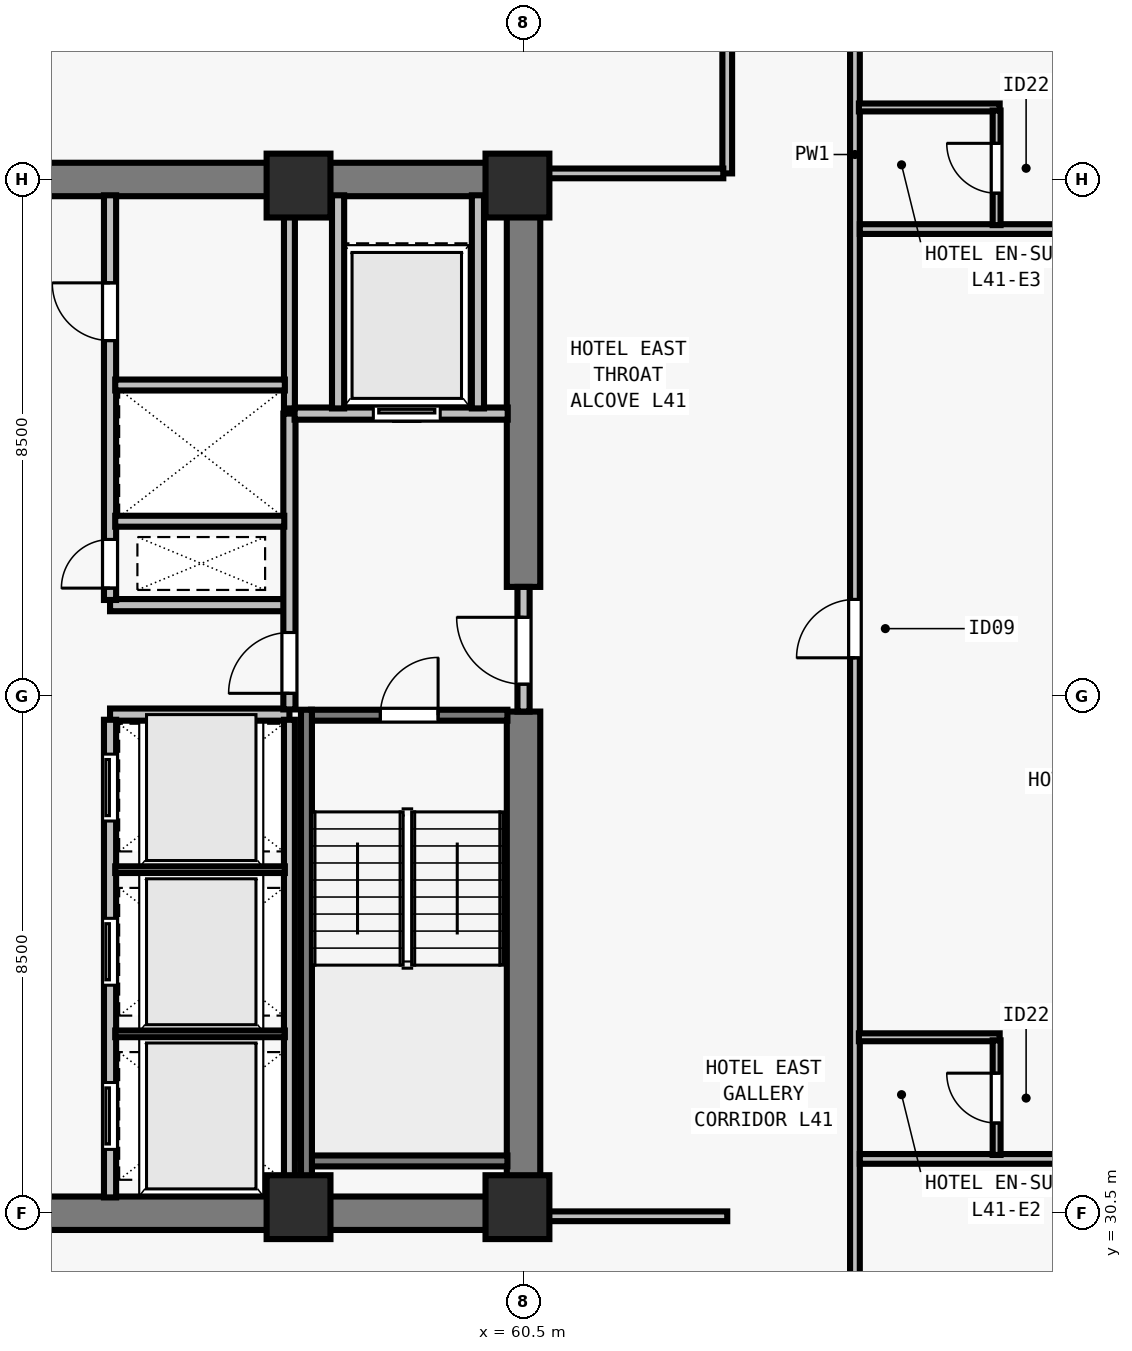
"""IFC4 building model, lengths in metres.
Left out: names, types, materials, properties, quantities, classifications, styles, units other than length and angle.
Written with IfcOpenShell. Run it as: python <this file> out.ifc"""

import sys

from ifc_helpers import new_model, si_unit, direction, frame, frame_2d, origin, origin_2d, place, context, subcontext, project, spatial, rectangle, extrude, element, fill, save


model = new_model("IFC4")
c1 = context("Model", 3, precision=1e-05, world=origin(), true_north=direction((0.0, 1.0)))
c2 = subcontext(c1, "Body", "Model", "MODEL_VIEW")
j1 = project(units=[si_unit("LENGTHUNIT", "METRE"), si_unit("PLANEANGLEUNIT", "RADIAN")], contexts=[c1])
p1 = place(None, origin())
s1 = spatial("IfcSite", under=j1, at=p1, CompositionType="ELEMENT")
p2 = place(p1, origin())
s2 = spatial("IfcBuilding", under=s1, at=p2, CompositionType="ELEMENT")
p3 = place(p2, frame((0.0, 0.0, 151.5)))
s3 = spatial("IfcBuildingStorey", under=s2, at=p3, CompositionType="ELEMENT", Elevation=151.5)
for number, where, z_axis, x_axis in (
    (1, (56.8, 30.6, 0.0), (0.0, 0.0, 1.0), (1.0, 0.0, 0.0)),
    (2, (60.4, 30.6, 0.0), (0.0, 0.0, 1.0), (1.0, 0.0, 0.0)),
    (3, (56.8, 47.4, 0.0), (0.0, 0.0, 1.0), (1.0, 0.0, 0.0)),
    (4, (60.4, 47.4, 0.0), (0.0, 0.0, 1.0), (1.0, 0.0, 0.0)),
):
    element("IfcColumn", number, at=place(p3, frame(where, z_axis=z_axis, x_axis=x_axis)), inside=s3, PredefinedType="COLUMN", context=c2, shape_type="SweptSolid", body=[
        extrude(rectangle(XDim=1.05, YDim=1.05, at=origin_2d()), origin(), (0.0, 0.0, 1.0), 3.5),
    ])
for number, where, z_axis, x_axis in (
    (5, (43.225, 30.5, 0.0), (0.0, 0.0, 1.0), (1.0, 0.0, 0.0)),
    (6, (43.225, 47.5, 0.0), (0.0, 0.0, 1.0), (1.0, 0.0, 0.0)),
):
    element("IfcWall", number, at=place(p3, frame(where, z_axis=z_axis, x_axis=x_axis)), inside=s3, PredefinedType="SHEAR", context=c2, shape_type="SweptSolid", body=[
        extrude(rectangle(XDim=17.55, YDim=0.55, at=frame_2d((8.775, 0.0))), origin(), (0.0, 0.0, 1.0), 3.28),
    ])
p4 = place(p3, frame((60.5, 30.765, 0.0), z_axis=(0.0, 0.0, 1.0), x_axis=(0.0, 1.0, 0.0)))
e7 = element("IfcWall", 7, at=p4, inside=s3, PredefinedType="SHEAR", context=c2, shape_type="SweptSolid", body=[
    extrude(rectangle(XDim=7.985, YDim=0.55, at=frame_2d((3.993, 0.0))), origin(), (0.0, 0.0, 1.0), 3.28),
])
p5 = place(p3, frame((60.5, 40.8, 0.0), z_axis=(0.0, 0.0, 1.0), x_axis=(0.0, 1.0, 0.0)))
e8 = element("IfcWall", 8, at=p5, inside=s3, PredefinedType="SHEAR", context=c2, shape_type="SweptSolid", body=[
    extrude(rectangle(XDim=6.435, YDim=0.55, at=frame_2d((3.218, 0.0))), origin(), (0.0, 0.0, 1.0), 3.28),
])
for number, where, z_axis, x_axis in (
    (9, (53.7, 38.7, 0.0), (0.0, 0.0, 1.0), (1.0, 0.0, 0.0)),
    (10, (53.7, 40.5, 0.0), (0.0, 0.0, 1.0), (1.0, 0.0, 0.0)),
):
    element("IfcWall", number, at=place(p3, frame(where, z_axis=z_axis, x_axis=x_axis)), inside=s3, PredefinedType="SOLIDWALL", context=c2, shape_type="SweptSolid", body=[
        extrude(rectangle(XDim=2.95, YDim=0.2, at=frame_2d((1.475, 0.0))), origin(), (0.0, 0.0, 1.0), 3.28),
    ])
p6 = place(p3, frame((53.7, 30.76, 0.0), z_axis=(0.0, 0.0, 1.0), x_axis=(0.0, 1.0, 0.0)))
e11 = element("IfcWall", 11, at=p6, inside=s3, PredefinedType="SOLIDWALL", context=c2, shape_type="SweptSolid", body=[
    extrude(rectangle(XDim=7.855, YDim=0.2, at=frame_2d((3.927, 0.0))), origin(), (0.0, 0.0, 1.0), 3.28),
])
p7 = place(p6, frame((0.79, 0.0, 0.0)))
e12 = element("IfcOpeningElement", 12, at=p7, cuts=e11, PredefinedType="OPENING", context=c2, shape_type="SweptSolid", body=[
    extrude(rectangle(XDim=1.1, YDim=2.2, at=frame_2d((0.55, 1.1))), frame((0.0, 0.11, 0.0), z_axis=(0.0, -1.0, 0.0), x_axis=(1.0, 0.0, 0.0)), (0.0, 0.0, 1.0), 0.22),
])
p8 = place(p6, frame((3.49, 0.0, 0.0)))
e13 = element("IfcOpeningElement", 13, at=p8, cuts=e11, PredefinedType="OPENING", context=c2, shape_type="SweptSolid", body=[
    extrude(rectangle(XDim=1.1, YDim=2.2, at=frame_2d((0.55, 1.1))), frame((0.0, 0.11, 0.0), z_axis=(0.0, -1.0, 0.0), x_axis=(1.0, 0.0, 0.0)), (0.0, 0.0, 1.0), 0.22),
])
p9 = place(p6, frame((6.19, 0.0, 0.0)))
e14 = element("IfcOpeningElement", 14, at=p9, cuts=e11, PredefinedType="OPENING", context=c2, shape_type="SweptSolid", body=[
    extrude(rectangle(XDim=1.1, YDim=2.2, at=frame_2d((0.55, 1.1))), frame((0.0, 0.11, 0.0), z_axis=(0.0, -1.0, 0.0), x_axis=(1.0, 0.0, 0.0)), (0.0, 0.0, 1.0), 0.22),
])
p10 = place(p3, frame((53.7, 40.585, 0.0), z_axis=(0.0, 0.0, 1.0), x_axis=(0.0, 1.0, 0.0)))
e15 = element("IfcWall", 15, at=p10, inside=s3, PredefinedType="SOLIDWALL", context=c2, shape_type="SweptSolid", body=[
    extrude(rectangle(XDim=6.655, YDim=0.2, at=frame_2d((3.328, 0.0))), origin(), (0.0, 0.0, 1.0), 3.28),
])
p11 = place(p10, frame((0.195, 0.0, 0.0)))
e16 = element("IfcOpeningElement", 16, at=p11, cuts=e15, PredefinedType="OPENING", context=c2, shape_type="SweptSolid", body=[
    extrude(rectangle(XDim=0.8, YDim=2.08, at=frame_2d((0.4, 1.04))), frame((0.0, 0.11, 0.0), z_axis=(0.0, -1.0, 0.0), x_axis=(1.0, 0.0, 0.0)), (0.0, 0.0, 1.0), 0.22),
])
p12 = place(p10, frame((4.265, 0.0, 0.0)))
e17 = element("IfcOpeningElement", 17, at=p12, cuts=e15, PredefinedType="OPENING", context=c2, shape_type="SweptSolid", body=[
    extrude(rectangle(XDim=0.95, YDim=2.12, at=frame_2d((0.475, 1.06))), frame((0.0, 0.11, 0.0), z_axis=(0.0, -1.0, 0.0), x_axis=(1.0, 0.0, 0.0)), (0.0, 0.0, 1.0), 0.22),
])
p13 = place(p3, frame((60.5, 38.75, 0.0), z_axis=(0.0, 0.0, 1.0), x_axis=(0.0, 1.0, 0.0)))
e18 = element("IfcWall", 18, at=p13, inside=s3, PredefinedType="SOLIDWALL", context=c2, shape_type="SweptSolid", body=[
    extrude(rectangle(XDim=2.05, YDim=0.2, at=frame_2d((1.025, 0.0))), origin(), (0.0, 0.0, 1.0), 3.28),
])
p14 = place(p13, frame((0.45, 0.0, 0.0)))
e19 = element("IfcOpeningElement", 19, at=p14, cuts=e18, PredefinedType="OPENING", context=c2, shape_type="SweptSolid", body=[
    extrude(rectangle(XDim=1.1, YDim=2.15, at=frame_2d((0.55, 1.075))), frame((0.0, 0.11, 0.0), z_axis=(0.0, -1.0, 0.0), x_axis=(1.0, 0.0, 0.0)), (0.0, 0.0, 1.0), 0.22),
])
p15 = place(p3, frame((56.65, 38.785, 0.0), z_axis=(0.0, 0.0, 1.0), x_axis=(0.0, 1.0, 0.0)))
e20 = element("IfcWall", 20, at=p15, inside=s3, PredefinedType="SOLIDWALL", context=c2, shape_type="SweptSolid", body=[
    extrude(rectangle(XDim=4.865, YDim=0.2, at=frame_2d((2.433, 0.0))), origin(), (0.0, 0.0, 1.0), 3.28),
])
p16 = place(p15, frame((0.265, 0.0, 0.0)))
e21 = element("IfcOpeningElement", 21, at=p16, cuts=e20, PredefinedType="OPENING", context=c2, shape_type="SweptSolid", body=[
    extrude(rectangle(XDim=1.0, YDim=2.15, at=frame_2d((0.5, 1.075))), frame((0.0, 0.11, 0.0), z_axis=(0.0, -1.0, 0.0), x_axis=(1.0, 0.0, 0.0)), (0.0, 0.0, 1.0), 0.22),
])
p17 = place(p3, frame((56.735, 43.65, 0.0), z_axis=(0.0, 0.0, 1.0), x_axis=(1.0, 0.0, 0.0)))
e22 = element("IfcWall", 22, at=p17, inside=s3, PredefinedType="SOLIDWALL", context=c2, shape_type="SweptSolid", body=[
    extrude(rectangle(XDim=3.505, YDim=0.2, at=frame_2d((1.752, 0.0))), origin(), (0.0, 0.0, 1.0), 3.28),
])
p18 = place(p17, frame((1.295, 0.0, 0.0)))
e23 = element("IfcOpeningElement", 23, at=p18, cuts=e22, PredefinedType="OPENING", context=c2, shape_type="SweptSolid", body=[
    extrude(rectangle(XDim=1.1, YDim=2.2, at=frame_2d((0.55, 1.1))), frame((0.0, 0.11, 0.0), z_axis=(0.0, -1.0, 0.0), x_axis=(1.0, 0.0, 0.0)), (0.0, 0.0, 1.0), 0.22),
])
for number, where, z_axis, x_axis in (
    (24, (57.45, 43.735, 0.0), (0.0, 0.0, 1.0), (0.0, 1.0, 0.0)),
    (25, (59.75, 43.735, 0.0), (0.0, 0.0, 1.0), (0.0, 1.0, 0.0)),
):
    element("IfcWall", number, at=place(p3, frame(where, z_axis=z_axis, x_axis=x_axis)), inside=s3, PredefinedType="SOLIDWALL", context=c2, shape_type="SweptSolid", body=[
        extrude(rectangle(XDim=3.505, YDim=0.2, at=frame_2d((1.752, 0.0))), origin(), (0.0, 0.0, 1.0), 3.28),
    ])
p19 = place(p3, frame((56.65, 30.76, 0.0), z_axis=(0.0, 0.0, 1.0), x_axis=(0.0, 1.0, 0.0)))
e26 = element("IfcWall", 26, at=p19, inside=s3, PredefinedType="SOLIDWALL", context=c2, shape_type="SweptSolid", body=[
    extrude(rectangle(XDim=7.855, YDim=0.18, at=frame_2d((3.927, 0.0))), origin(), (0.0, 0.0, 1.0), 3.28),
])
for number, where, z_axis, x_axis in (
    (27, (53.785, 33.45, 0.0), (0.0, 0.0, 1.0), (1.0, 0.0, 0.0)),
    (28, (53.785, 36.15, 0.0), (0.0, 0.0, 1.0), (1.0, 0.0, 0.0)),
):
    element("IfcWall", number, at=place(p3, frame(where, z_axis=z_axis, x_axis=x_axis)), inside=s3, PredefinedType="PARTITIONING", context=c2, shape_type="SweptSolid", body=[
        extrude(rectangle(XDim=2.79, YDim=0.11, at=frame_2d((1.395, 0.0))), origin(), (0.0, 0.0, 1.0), 3.28),
    ])
p20 = place(p3, frame((56.65, 43.735, 0.0), z_axis=(0.0, 0.0, 1.0), x_axis=(0.0, 1.0, 0.0)))
e29 = element("IfcWall", 29, at=p20, inside=s3, PredefinedType="SOLIDWALL", context=c2, shape_type="SweptSolid", body=[
    extrude(rectangle(XDim=3.505, YDim=0.18, at=frame_2d((1.752, 0.0))), origin(), (0.0, 0.0, 1.0), 3.28),
])
p21 = place(p3, frame((53.785, 41.88, 0.0), z_axis=(0.0, 0.0, 1.0), x_axis=(1.0, 0.0, 0.0)))
e30 = element("IfcWall", 30, at=p21, inside=s3, PredefinedType="SOLIDWALL", context=c2, shape_type="SweptSolid", body=[
    extrude(rectangle(XDim=2.78, YDim=0.18, at=frame_2d((1.39, 0.0))), origin(), (0.0, 0.0, 1.0), 3.28),
])
p22 = place(p3, frame((53.785, 44.12, 0.0), z_axis=(0.0, 0.0, 1.0), x_axis=(1.0, 0.0, 0.0)))
e31 = element("IfcWall", 31, at=p22, inside=s3, PredefinedType="SOLIDWALL", context=c2, shape_type="SweptSolid", body=[
    extrude(rectangle(XDim=2.79, YDim=0.18, at=frame_2d((1.395, 0.0))), origin(), (0.0, 0.0, 1.0), 3.28),
])
p23 = place(p3, frame((65.95, 15.325, 0.0), z_axis=(0.0, 0.0, 1.0), x_axis=(0.0, 1.0, 0.0)))
e32 = element("IfcWall", 32, at=p23, inside=s3, PredefinedType="PARTITIONING", context=c2, shape_type="SweptSolid", body=[
    extrude(rectangle(XDim=47.35, YDim=0.16, at=frame_2d((23.675, 0.0))), origin(), (0.0, 0.0, 1.0), 2.555),
])
p24 = place(p23, frame((8.902, 0.0, 0.0)))
e33 = element("IfcOpeningElement", 33, at=p24, cuts=e32, PredefinedType="OPENING", context=c2, shape_type="SweptSolid", body=[
    extrude(rectangle(XDim=0.96, YDim=2.15, at=frame_2d((0.48, 1.075))), frame((0.0, 0.09, 0.0), z_axis=(0.0, -1.0, 0.0), x_axis=(1.0, 0.0, 0.0)), (0.0, 0.0, 1.0), 0.18),
])
p25 = place(p23, frame((24.309, 0.0, 0.0)))
e34 = element("IfcOpeningElement", 34, at=p25, cuts=e32, PredefinedType="OPENING", context=c2, shape_type="SweptSolid", body=[
    extrude(rectangle(XDim=0.96, YDim=2.15, at=frame_2d((0.48, 1.075))), frame((0.0, 0.09, 0.0), z_axis=(0.0, -1.0, 0.0), x_axis=(1.0, 0.0, 0.0)), (0.0, 0.0, 1.0), 0.18),
])
p26 = place(p23, frame((39.902, 0.0, 0.0)))
e35 = element("IfcOpeningElement", 35, at=p26, cuts=e32, PredefinedType="OPENING", context=c2, shape_type="SweptSolid", body=[
    extrude(rectangle(XDim=0.96, YDim=2.15, at=frame_2d((0.48, 1.075))), frame((0.0, 0.09, 0.0), z_axis=(0.0, -1.0, 0.0), x_axis=(1.0, 0.0, 0.0)), (0.0, 0.0, 1.0), 0.18),
])
p27 = place(p3, frame((63.85, 47.6, 0.0), z_axis=(0.0, 0.0, 1.0), x_axis=(0.0, 1.0, 0.0)))
e36 = element("IfcWall", 36, at=p27, inside=s3, PredefinedType="PARTITIONING", context=c2, shape_type="SweptSolid", body=[
    extrude(rectangle(XDim=15.075, YDim=0.16, at=frame_2d((7.538, 0.0))), origin(), (0.0, 0.0, 1.0), 2.555),
])
p28 = place(p3, frame((60.765, 30.45, 0.0), z_axis=(0.0, 0.0, 1.0), x_axis=(1.0, 0.0, 0.0)))
e37 = element("IfcWall", 37, at=p28, inside=s3, PredefinedType="PARTITIONING", context=c2, shape_type="SweptSolid", body=[
    extrude(rectangle(XDim=3.085, YDim=0.16, at=frame_2d((1.542, 0.0))), origin(), (0.0, 0.0, 1.0), 3.28),
])
p29 = place(p3, frame((60.765, 47.6, 0.0), z_axis=(0.0, 0.0, 1.0), x_axis=(1.0, 0.0, 0.0)))
e38 = element("IfcWall", 38, at=p29, inside=s3, PredefinedType="PARTITIONING", context=c2, shape_type="SweptSolid", body=[
    extrude(rectangle(XDim=3.02, YDim=0.16, at=frame_2d((1.51, 0.0))), origin(), (0.0, 0.0, 1.0), 3.28),
])
p30 = place(p3, frame((66.03, 31.394, 0.0), z_axis=(0.0, 0.0, 1.0), x_axis=(1.0, 0.0, 0.0)))
e39 = element("IfcWall", 39, at=p30, inside=s3, PredefinedType="PARTITIONING", context=c2, shape_type="SweptSolid", body=[
    extrude(rectangle(XDim=9.645, YDim=0.16, at=frame_2d((4.823, 0.0))), origin(), (0.0, 0.0, 1.0), 3.28),
])
p31 = place(p3, frame((66.015, 33.394, 0.0), z_axis=(0.0, 0.0, 1.0), x_axis=(1.0, 0.0, 0.0)))
e40 = element("IfcWall", 40, at=p31, inside=s3, PredefinedType="PLUMBINGWALL", context=c2, shape_type="SweptSolid", body=[
    extrude(rectangle(XDim=2.315, YDim=0.13, at=frame_2d((1.158, 0.0))), origin(), (0.0, 0.0, 1.0), 3.28),
])
p32 = place(p3, frame((68.28, 31.458, 0.0), z_axis=(0.0, 0.0, 1.0), x_axis=(0.0, 1.0, 0.0)))
e41 = element("IfcWall", 41, at=p32, inside=s3, PredefinedType="PLUMBINGWALL", context=c2, shape_type="SweptSolid", body=[
    extrude(rectangle(XDim=1.885, YDim=0.13, at=frame_2d((0.942, 0.0))), origin(), (0.0, 0.0, 1.0), 3.28),
])
p33 = place(p32, frame((0.525, 0.0, 0.0)))
e42 = element("IfcOpeningElement", 42, at=p33, cuts=e41, PredefinedType="OPENING", context=c2, shape_type="SweptSolid", body=[
    extrude(rectangle(XDim=0.82, YDim=2.1, at=frame_2d((0.41, 1.05))), frame((0.0, 0.075, 0.0), z_axis=(0.0, -1.0, 0.0), x_axis=(1.0, 0.0, 0.0)), (0.0, 0.0, 1.0), 0.15),
])
p34 = place(p3, frame((66.03, 46.685, 0.0), z_axis=(0.0, 0.0, 1.0), x_axis=(1.0, 0.0, 0.0)))
e43 = element("IfcWall", 43, at=p34, inside=s3, PredefinedType="PARTITIONING", context=c2, shape_type="SweptSolid", body=[
    extrude(rectangle(XDim=9.645, YDim=0.16, at=frame_2d((4.823, 0.0))), origin(), (0.0, 0.0, 1.0), 3.28),
])
p35 = place(p3, frame((66.015, 48.685, 0.0), z_axis=(0.0, 0.0, 1.0), x_axis=(1.0, 0.0, 0.0)))
e44 = element("IfcWall", 44, at=p35, inside=s3, PredefinedType="PLUMBINGWALL", context=c2, shape_type="SweptSolid", body=[
    extrude(rectangle(XDim=2.315, YDim=0.13, at=frame_2d((1.158, 0.0))), origin(), (0.0, 0.0, 1.0), 3.28),
])
p36 = place(p3, frame((68.28, 46.75, 0.0), z_axis=(0.0, 0.0, 1.0), x_axis=(0.0, 1.0, 0.0)))
e45 = element("IfcWall", 45, at=p36, inside=s3, PredefinedType="PLUMBINGWALL", context=c2, shape_type="SweptSolid", body=[
    extrude(rectangle(XDim=1.885, YDim=0.13, at=frame_2d((0.942, 0.0))), origin(), (0.0, 0.0, 1.0), 3.28),
])
p37 = place(p36, frame((0.525, 0.0, 0.0)))
e46 = element("IfcOpeningElement", 46, at=p37, cuts=e45, PredefinedType="OPENING", context=c2, shape_type="SweptSolid", body=[
    extrude(rectangle(XDim=0.82, YDim=2.1, at=frame_2d((0.41, 1.05))), frame((0.0, 0.075, 0.0), z_axis=(0.0, -1.0, 0.0), x_axis=(1.0, 0.0, 0.0)), (0.0, 0.0, 1.0), 0.15),
])
p38 = place(p3, frame((57.005, 38.69, 0.0), z_axis=(0.0, 0.0, 1.0), x_axis=(1.0, 0.0, 0.0)))
e47 = element("IfcWall", 47, at=p38, inside=s3, PredefinedType="SOLIDWALL", context=c2, shape_type="SweptSolid", body=[
    extrude(rectangle(XDim=3.23, YDim=0.18, at=frame_2d((1.615, 0.0))), origin(), (0.0, 0.0, 1.0), 3.28),
])
p39 = place(p38, frame((1.14, 0.0, 0.0)))
e48 = element("IfcOpeningElement", 48, at=p39, cuts=e47, PredefinedType="OPENING", context=c2, shape_type="SweptSolid", body=[
    extrude(rectangle(XDim=0.95, YDim=2.15, at=frame_2d((0.475, 1.075))), frame((0.0, 0.1, 0.0), z_axis=(0.0, -1.0, 0.0), x_axis=(1.0, 0.0, 0.0)), (0.0, 0.0, 1.0), 0.2),
])
p40 = place(p3, frame((57.005, 31.36, 0.0), z_axis=(0.0, 0.0, 1.0), x_axis=(1.0, 0.0, 0.0)))
e49 = element("IfcWall", 49, at=p40, inside=s3, PredefinedType="SOLIDWALL", context=c2, shape_type="SweptSolid", body=[
    extrude(rectangle(XDim=3.23, YDim=0.18, at=frame_2d((1.615, 0.0))), origin(), (0.0, 0.0, 1.0), 3.28),
])
p41 = place(p3, frame((56.93, 38.78, 0.0), z_axis=(0.0, 0.0, 1.0), x_axis=(0.0, -1.0, 0.0)))
e50 = element("IfcWall", 50, at=p41, inside=s3, PredefinedType="SOLIDWALL", context=c2, shape_type="SweptSolid", body=[
    extrude(rectangle(XDim=8.017, YDim=0.18, at=frame_2d((4.009, 0.0))), origin(), (0.0, 0.0, 1.0), 3.28),
])
p42 = place(p14, origin())
e51 = element("IfcDoor", 51, at=p42, inside=s3, OperationType="SINGLE_SWING_RIGHT", PredefinedType="DOOR", context=c2, shape_type="SweptSolid", body=[
    extrude(rectangle(XDim=1.1, YDim=2.15, at=frame_2d((0.55, 1.075))), frame((0.0, 0.025, 0.0), z_axis=(0.0, -1.0, 0.0), x_axis=(1.0, 0.0, 0.0)), (0.0, 0.0, 1.0), 0.05),
])
fill(e19, e51)
p43 = place(p16, origin())
e52 = element("IfcDoor", 52, at=p43, inside=s3, OperationType="SINGLE_SWING_LEFT", PredefinedType="DOOR", context=c2, shape_type="SweptSolid", body=[
    extrude(rectangle(XDim=1.0, YDim=2.15, at=frame_2d((0.5, 1.075))), frame((0.0, 0.025, 0.0), z_axis=(0.0, -1.0, 0.0), x_axis=(1.0, 0.0, 0.0)), (0.0, 0.0, 1.0), 0.05),
])
fill(e21, e52)
p44 = place(p18, origin())
e53 = element("IfcDoor", 53, at=p44, inside=s3, OperationType="SLIDING_TO_LEFT", PredefinedType="DOOR", context=c2, shape_type="SweptSolid", body=[
    extrude(rectangle(XDim=1.1, YDim=2.2, at=frame_2d((0.55, 1.1))), frame((0.0, 0.025, 0.0), z_axis=(0.0, -1.0, 0.0), x_axis=(1.0, 0.0, 0.0)), (0.0, 0.0, 1.0), 0.05),
])
fill(e23, e53)
p45 = place(p7, origin())
e54 = element("IfcDoor", 54, at=p45, inside=s3, OperationType="SLIDING_TO_LEFT", PredefinedType="DOOR", context=c2, shape_type="SweptSolid", body=[
    extrude(rectangle(XDim=1.1, YDim=2.2, at=frame_2d((0.55, 1.1))), frame((0.0, 0.025, 0.0), z_axis=(0.0, -1.0, 0.0), x_axis=(1.0, 0.0, 0.0)), (0.0, 0.0, 1.0), 0.05),
])
fill(e12, e54)
p46 = place(p8, origin())
e55 = element("IfcDoor", 55, at=p46, inside=s3, OperationType="SLIDING_TO_LEFT", PredefinedType="DOOR", context=c2, shape_type="SweptSolid", body=[
    extrude(rectangle(XDim=1.1, YDim=2.2, at=frame_2d((0.55, 1.1))), frame((0.0, 0.025, 0.0), z_axis=(0.0, -1.0, 0.0), x_axis=(1.0, 0.0, 0.0)), (0.0, 0.0, 1.0), 0.05),
])
fill(e13, e55)
p47 = place(p9, origin())
e56 = element("IfcDoor", 56, at=p47, inside=s3, OperationType="SLIDING_TO_LEFT", PredefinedType="DOOR", context=c2, shape_type="SweptSolid", body=[
    extrude(rectangle(XDim=1.1, YDim=2.2, at=frame_2d((0.55, 1.1))), frame((0.0, 0.025, 0.0), z_axis=(0.0, -1.0, 0.0), x_axis=(1.0, 0.0, 0.0)), (0.0, 0.0, 1.0), 0.05),
])
fill(e14, e56)
p48 = place(p11, origin())
e57 = element("IfcDoor", 57, at=p48, inside=s3, OperationType="SINGLE_SWING_LEFT", PredefinedType="DOOR", context=c2, shape_type="SweptSolid", body=[
    extrude(rectangle(XDim=0.8, YDim=2.08, at=frame_2d((0.4, 1.04))), frame((0.0, 0.025, 0.0), z_axis=(0.0, -1.0, 0.0), x_axis=(1.0, 0.0, 0.0)), (0.0, 0.0, 1.0), 0.05),
])
fill(e16, e57)
p49 = place(p12, origin())
e58 = element("IfcDoor", 58, at=p49, inside=s3, OperationType="SINGLE_SWING_RIGHT", PredefinedType="DOOR", context=c2, shape_type="SweptSolid", body=[
    extrude(rectangle(XDim=0.95, YDim=2.12, at=frame_2d((0.475, 1.06))), frame((0.0, 0.025, 0.0), z_axis=(0.0, -1.0, 0.0), x_axis=(1.0, 0.0, 0.0)), (0.0, 0.0, 1.0), 0.05),
])
fill(e17, e58)
p50 = place(p33, origin())
e59 = element("IfcDoor", 59, at=p50, inside=s3, OperationType="SINGLE_SWING_RIGHT", PredefinedType="DOOR", context=c2, shape_type="SweptSolid", body=[
    extrude(rectangle(XDim=0.82, YDim=2.1, at=frame_2d((0.41, 1.05))), frame((0.0, 0.025, 0.0), z_axis=(0.0, -1.0, 0.0), x_axis=(1.0, 0.0, 0.0)), (0.0, 0.0, 1.0), 0.05),
])
fill(e42, e59)
p51 = place(p25, origin())
e60 = element("IfcDoor", 60, at=p51, inside=s3, OperationType="SINGLE_SWING_LEFT", PredefinedType="DOOR", context=c2, shape_type="SweptSolid", body=[
    extrude(rectangle(XDim=0.96, YDim=2.15, at=frame_2d((0.48, 1.075))), frame((0.0, 0.025, 0.0), z_axis=(0.0, -1.0, 0.0), x_axis=(1.0, 0.0, 0.0)), (0.0, 0.0, 1.0), 0.05),
])
fill(e34, e60)
p52 = place(p37, origin())
e61 = element("IfcDoor", 61, at=p52, inside=s3, OperationType="SINGLE_SWING_RIGHT", PredefinedType="DOOR", context=c2, shape_type="SweptSolid", body=[
    extrude(rectangle(XDim=0.82, YDim=2.1, at=frame_2d((0.41, 1.05))), frame((0.0, 0.025, 0.0), z_axis=(0.0, -1.0, 0.0), x_axis=(1.0, 0.0, 0.0)), (0.0, 0.0, 1.0), 0.05),
])
fill(e46, e61)
p53 = place(p39, origin())
e62 = element("IfcDoor", 62, at=p53, inside=s3, OperationType="SINGLE_SWING_RIGHT", PredefinedType="DOOR", context=c2, shape_type="SweptSolid", body=[
    extrude(rectangle(XDim=0.95, YDim=2.15, at=frame_2d((0.475, 1.075))), frame((0.0, 0.025, 0.0), z_axis=(0.0, -1.0, 0.0), x_axis=(1.0, 0.0, 0.0)), (0.0, 0.0, 1.0), 0.05),
])
fill(e48, e62)
save(model, sys.argv[1])
